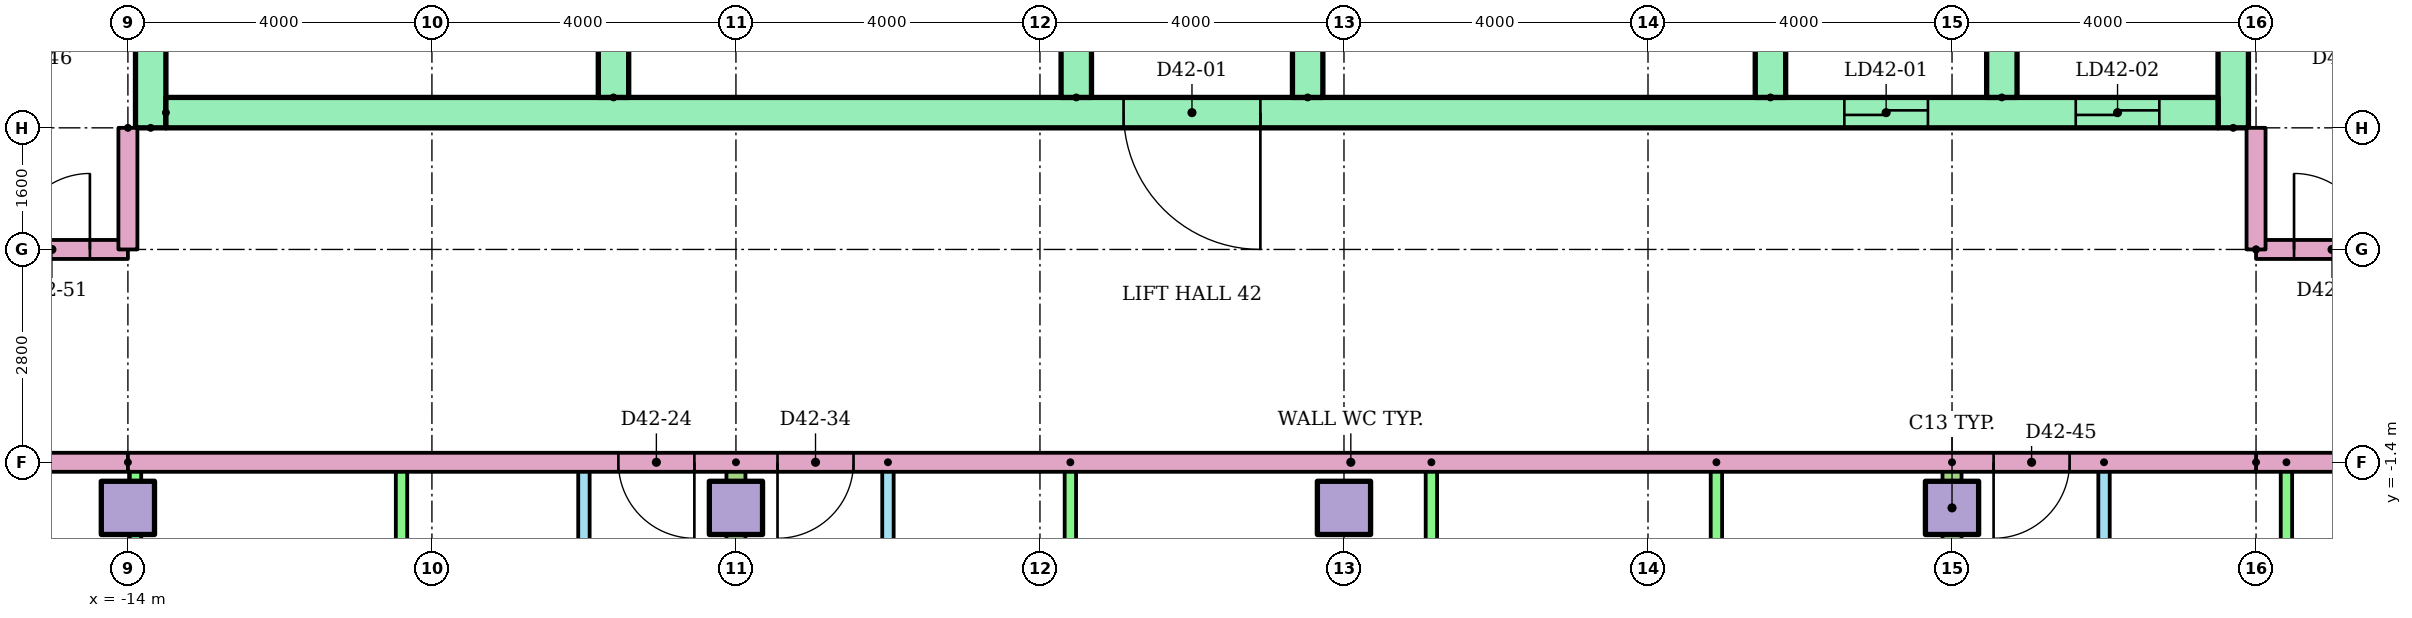
"""IFC4 building model, lengths in metres.
Left out: names, types, materials, properties, quantities, classifications, styles, units other than length and angle.
Written with IfcOpenShell. Run it as: python <this file> out.ifc"""

import sys

from ifc_helpers import new_model, si_unit, direction, frame, frame_2d, origin, origin_2d, place, context, subcontext, project, spatial, rectangle, extrude, element, fill, save


model = new_model("IFC4")
c1 = context("Model", 3, precision=1e-05, world=origin(), true_north=direction((0.0, 1.0)))
c2 = subcontext(c1, "Body", "Model", "MODEL_VIEW")
j1 = project(units=[si_unit("LENGTHUNIT", "METRE"), si_unit("PLANEANGLEUNIT", "RADIAN")], contexts=[c1])
p1 = place(None, origin())
s1 = spatial("IfcSite", under=j1, at=p1, CompositionType="ELEMENT")
p2 = place(p1, origin())
s2 = spatial("IfcBuilding", under=s1, at=p2, CompositionType="ELEMENT")
p3 = place(p2, frame((0.0, 0.0, 165.3)))
s3 = spatial("IfcBuildingStorey", under=s2, at=p3, CompositionType="ELEMENT", Elevation=165.3)
for number, where in (
    (1, (-14.0, -2.0, 0.0)),
    (2, (-6.0, -2.0, 0.0)),
    (3, (2.0, -2.0, 0.0)),
    (4, (10.0, -2.0, 0.0)),
):
    element("IfcColumn", number, at=place(p3, frame(where)), inside=s3, PredefinedType="COLUMN", context=c2, shape_type="SweptSolid", body=[
        extrude(rectangle(XDim=0.7, YDim=0.7, at=origin_2d()), origin(), (0.0, 0.0, 1.0), 3.2),
    ])
for number, where, z_axis, x_axis in (
    (5, (-13.7, 3.0, 0.0), (0.0, 0.0, 1.0), (0.0, 1.0, 0.0)),
    (6, (13.7, 3.0, 0.0), (0.0, 0.0, 1.0), (0.0, 1.0, 0.0)),
):
    element("IfcWall", number, at=place(p3, frame(where, z_axis=z_axis, x_axis=x_axis)), inside=s3, PredefinedType="SHEAR", context=c2, shape_type="SweptSolid", body=[
        extrude(rectangle(XDim=17.0, YDim=0.4, at=frame_2d((8.5, 0.0))), origin(), (0.0, 0.0, 1.0), 2.92),
    ])
p4 = place(p3, frame((-13.5, 3.2, 0.0)))
e7 = element("IfcWall", 7, at=p4, inside=s3, PredefinedType="SHEAR", context=c2, shape_type="SweptSolid", body=[
    extrude(rectangle(XDim=27.0, YDim=0.4, at=frame_2d((13.5, 0.0))), origin(), (0.0, 0.0, 1.0), 2.92),
])
p5 = place(p4, frame((22.083, 0.0, 0.0)))
e8 = element("IfcOpeningElement", 8, at=p5, cuts=e7, PredefinedType="OPENING", context=c2, shape_type="SweptSolid", body=[
    extrude(rectangle(XDim=1.1, YDim=2.1, at=frame_2d((0.55, 1.05))), frame((0.0, 0.21, 0.0), z_axis=(0.0, -1.0, 0.0), x_axis=(1.0, 0.0, 0.0)), (0.0, 0.0, 1.0), 0.42),
])
p6 = place(p4, frame((25.128, 0.0, 0.0)))
e9 = element("IfcOpeningElement", 9, at=p6, cuts=e7, PredefinedType="OPENING", context=c2, shape_type="SweptSolid", body=[
    extrude(rectangle(XDim=1.1, YDim=2.1, at=frame_2d((0.55, 1.05))), frame((0.0, 0.21, 0.0), z_axis=(0.0, -1.0, 0.0), x_axis=(1.0, 0.0, 0.0)), (0.0, 0.0, 1.0), 0.42),
])
p7 = place(p4, frame((12.6, 0.0, 0.0)))
e10 = element("IfcOpeningElement", 10, at=p7, cuts=e7, PredefinedType="OPENING", context=c2, shape_type="SweptSolid", body=[
    extrude(rectangle(XDim=1.8, YDim=2.1, at=frame_2d((0.9, 1.05))), frame((0.0, 0.21, 0.0), z_axis=(0.0, -1.0, 0.0), x_axis=(1.0, 0.0, 0.0)), (0.0, 0.0, 1.0), 0.42),
])
for number, where, z_axis, x_axis in (
    (11, (-7.611, 3.4, 0.0), (0.0, 0.0, 1.0), (0.0, 1.0, 0.0)),
    (12, (-1.522, 3.4, 0.0), (0.0, 0.0, 1.0), (0.0, 1.0, 0.0)),
    (13, (1.522, 3.4, 0.0), (0.0, 0.0, 1.0), (0.0, 1.0, 0.0)),
    (14, (7.611, 3.4, 0.0), (0.0, 0.0, 1.0), (0.0, 1.0, 0.0)),
    (15, (10.656, 3.4, 0.0), (0.0, 0.0, 1.0), (0.0, 1.0, 0.0)),
):
    element("IfcWall", number, at=place(p3, frame(where, z_axis=z_axis, x_axis=x_axis)), inside=s3, PredefinedType="SHEAR", context=c2, shape_type="SweptSolid", body=[
        extrude(rectangle(XDim=3.0, YDim=0.4, at=frame_2d((1.5, 0.0))), origin(), (0.0, 0.0, 1.0), 2.92),
    ])
p8 = place(p3, frame((-8.0, -8.1, 0.0), z_axis=(0.0, 0.0, 1.0), x_axis=(0.0, 1.0, 0.0)))
e16 = element("IfcWall", 16, at=p8, inside=s3, PredefinedType="PARTITIONING", context=c2, shape_type="SweptSolid", body=[
    extrude(rectangle(XDim=6.7, YDim=0.15, at=frame_2d((3.35, 0.0))), origin(), (0.0, 0.0, 1.0), 2.4),
])
p9 = place(p8, frame((4.375, 0.0, 0.0)))
e17 = element("IfcOpeningElement", 17, at=p9, cuts=e16, PredefinedType="OPENING", context=c2, shape_type="SweptSolid", body=[
    extrude(rectangle(XDim=0.9, YDim=2.1, at=frame_2d((0.45, 1.05))), frame((0.0, 0.085, 0.0), z_axis=(0.0, -1.0, 0.0), x_axis=(1.0, 0.0, 0.0)), (0.0, 0.0, 1.0), 0.17),
])
p10 = place(p8, frame((1.075, 0.0, 0.0)))
e18 = element("IfcOpeningElement", 18, at=p10, cuts=e16, PredefinedType="OPENING", context=c2, shape_type="SweptSolid", body=[
    extrude(rectangle(XDim=0.8, YDim=2.1, at=frame_2d((0.4, 1.05))), frame((0.0, 0.085, 0.0), z_axis=(0.0, -1.0, 0.0), x_axis=(1.0, 0.0, 0.0)), (0.0, 0.0, 1.0), 0.17),
])
for number, where, z_axis, x_axis in (
    (19, (-10.4, -8.1, 0.0), (0.0, 0.0, 1.0), (0.0, 1.0, 0.0)),
    (20, (-13.9, -8.1, 0.0), (0.0, 0.0, 1.0), (0.0, 1.0, 0.0)),
):
    element("IfcWall", number, at=place(p3, frame(where, z_axis=z_axis, x_axis=x_axis)), inside=s3, PredefinedType="PARTITIONING", context=c2, shape_type="SweptSolid", body=[
        extrude(rectangle(XDim=6.7, YDim=0.15, at=frame_2d((3.35, 0.0))), origin(), (0.0, 0.0, 1.0), 2.4),
    ])
p11 = place(p3, frame((-4.0, -1.4, 0.0), z_axis=(0.0, 0.0, 1.0), x_axis=(0.0, -1.0, 0.0)))
e21 = element("IfcWall", 21, at=p11, inside=s3, PredefinedType="PARTITIONING", context=c2, shape_type="SweptSolid", body=[
    extrude(rectangle(XDim=6.7, YDim=0.15, at=frame_2d((3.35, 0.0))), origin(), (0.0, 0.0, 1.0), 2.4),
])
p12 = place(p11, frame((1.425, 0.0, 0.0)))
e22 = element("IfcOpeningElement", 22, at=p12, cuts=e21, PredefinedType="OPENING", context=c2, shape_type="SweptSolid", body=[
    extrude(rectangle(XDim=0.9, YDim=2.1, at=frame_2d((0.45, 1.05))), frame((0.0, 0.085, 0.0), z_axis=(0.0, -1.0, 0.0), x_axis=(1.0, 0.0, 0.0)), (0.0, 0.0, 1.0), 0.17),
])
p13 = place(p11, frame((4.825, 0.0, 0.0)))
e23 = element("IfcOpeningElement", 23, at=p13, cuts=e21, PredefinedType="OPENING", context=c2, shape_type="SweptSolid", body=[
    extrude(rectangle(XDim=0.8, YDim=2.1, at=frame_2d((0.4, 1.05))), frame((0.0, 0.085, 0.0), z_axis=(0.0, -1.0, 0.0), x_axis=(1.0, 0.0, 0.0)), (0.0, 0.0, 1.0), 0.17),
])
for number, where, z_axis, x_axis in (
    (24, (-1.6, -1.4, 0.0), (0.0, 0.0, 1.0), (0.0, -1.0, 0.0)),
    (25, (3.15, -1.4, 0.0), (0.0, 0.0, 1.0), (0.0, -1.0, 0.0)),
    (26, (6.9, -1.4, 0.0), (0.0, 0.0, 1.0), (0.0, -1.0, 0.0)),
):
    element("IfcWall", number, at=place(p3, frame(where, z_axis=z_axis, x_axis=x_axis)), inside=s3, PredefinedType="PARTITIONING", context=c2, shape_type="SweptSolid", body=[
        extrude(rectangle(XDim=6.7, YDim=0.15, at=frame_2d((3.35, 0.0))), origin(), (0.0, 0.0, 1.0), 2.4),
    ])
p14 = place(p3, frame((-6.0, -1.4, 0.0), z_axis=(0.0, 0.0, 1.0), x_axis=(0.0, -1.0, 0.0)))
e27 = element("IfcWall", 27, at=p14, inside=s3, PredefinedType="PARTITIONING", context=c2, shape_type="SweptSolid", body=[
    extrude(rectangle(XDim=15.01, YDim=0.25, at=frame_2d((7.505, 0.0))), origin(), (0.0, 0.0, 1.0), 2.4),
])
p15 = place(p3, frame((12.0, -1.4, 0.0), z_axis=(0.0, 0.0, 1.0), x_axis=(0.0, -1.0, 0.0)))
e28 = element("IfcWall", 28, at=p15, inside=s3, PredefinedType="PARTITIONING", context=c2, shape_type="SweptSolid", body=[
    extrude(rectangle(XDim=6.7, YDim=0.15, at=frame_2d((3.35, 0.0))), origin(), (0.0, 0.0, 1.0), 2.4),
])
p16 = place(p15, frame((1.425, 0.0, 0.0)))
e29 = element("IfcOpeningElement", 29, at=p16, cuts=e28, PredefinedType="OPENING", context=c2, shape_type="SweptSolid", body=[
    extrude(rectangle(XDim=0.9, YDim=2.1, at=frame_2d((0.45, 1.05))), frame((0.0, 0.085, 0.0), z_axis=(0.0, -1.0, 0.0), x_axis=(1.0, 0.0, 0.0)), (0.0, 0.0, 1.0), 0.17),
])
p17 = place(p15, frame((4.825, 0.0, 0.0)))
e30 = element("IfcOpeningElement", 30, at=p17, cuts=e28, PredefinedType="OPENING", context=c2, shape_type="SweptSolid", body=[
    extrude(rectangle(XDim=0.8, YDim=2.1, at=frame_2d((0.4, 1.05))), frame((0.0, 0.085, 0.0), z_axis=(0.0, -1.0, 0.0), x_axis=(1.0, 0.0, 0.0)), (0.0, 0.0, 1.0), 0.17),
])
p18 = place(p3, frame((14.4, -1.4, 0.0), z_axis=(0.0, 0.0, 1.0), x_axis=(0.0, -1.0, 0.0)))
e31 = element("IfcWall", 31, at=p18, inside=s3, PredefinedType="PARTITIONING", context=c2, shape_type="SweptSolid", body=[
    extrude(rectangle(XDim=6.7, YDim=0.15, at=frame_2d((3.35, 0.0))), origin(), (0.0, 0.0, 1.0), 2.4),
])
p19 = place(p3, frame((10.0, -1.4, 0.0), z_axis=(0.0, 0.0, 1.0), x_axis=(0.0, -1.0, 0.0)))
e32 = element("IfcWall", 32, at=p19, inside=s3, PredefinedType="PARTITIONING", context=c2, shape_type="SweptSolid", body=[
    extrude(rectangle(XDim=15.01, YDim=0.25, at=frame_2d((7.505, 0.0))), origin(), (0.0, 0.0, 1.0), 2.4),
])
p20 = place(p3, frame((-14.0, -1.4, 0.0), z_axis=(0.0, 0.0, 1.0), x_axis=(-1.0, 0.0, 0.0)))
e33 = element("IfcWall", 33, at=p20, inside=s3, PredefinedType="PARTITIONING", context=c2, shape_type="SweptSolid", body=[
    extrude(rectangle(XDim=10.82, YDim=0.25, at=frame_2d((5.41, 0.0))), origin(), (0.0, 0.0, 1.0), 2.4),
])
p21 = place(p3, frame((29.0, -1.4, 0.0), z_axis=(0.0, 0.0, 1.0), x_axis=(-1.0, 0.0, 0.0)))
e34 = element("IfcWall", 34, at=p21, inside=s3, PredefinedType="PARTITIONING", context=c2, shape_type="SweptSolid", body=[
    extrude(rectangle(XDim=15.0, YDim=0.25, at=frame_2d((7.5, 0.0))), origin(), (0.0, 0.0, 1.0), 2.4),
])
p22 = place(p3, frame((-24.82, 1.4, 0.0)))
e35 = element("IfcWall", 35, at=p22, inside=s3, PredefinedType="PARTITIONING", context=c2, shape_type="SweptSolid", body=[
    extrude(rectangle(XDim=10.82, YDim=0.25, at=frame_2d((5.41, 0.0))), origin(), (0.0, 0.0, 1.0), 2.4),
])
p23 = place(p22, frame((9.32, 0.0, 0.0)))
e36 = element("IfcOpeningElement", 36, at=p23, cuts=e35, PredefinedType="OPENING", context=c2, shape_type="SweptSolid", body=[
    extrude(rectangle(XDim=1.0, YDim=2.1, at=frame_2d((0.5, 1.05))), frame((0.0, 0.135, 0.0), z_axis=(0.0, -1.0, 0.0), x_axis=(1.0, 0.0, 0.0)), (0.0, 0.0, 1.0), 0.27),
])
p24 = place(p3, frame((14.0, 1.4, 0.0)))
e37 = element("IfcWall", 37, at=p24, inside=s3, PredefinedType="PARTITIONING", context=c2, shape_type="SweptSolid", body=[
    extrude(rectangle(XDim=15.0, YDim=0.25, at=frame_2d((7.5, 0.0))), origin(), (0.0, 0.0, 1.0), 2.4),
])
p25 = place(p24, frame((0.5, 0.0, 0.0)))
e38 = element("IfcOpeningElement", 38, at=p25, cuts=e37, PredefinedType="OPENING", context=c2, shape_type="SweptSolid", body=[
    extrude(rectangle(XDim=1.0, YDim=2.1, at=frame_2d((0.5, 1.05))), frame((0.0, 0.135, 0.0), z_axis=(0.0, -1.0, 0.0), x_axis=(1.0, 0.0, 0.0)), (0.0, 0.0, 1.0), 0.27),
])
p26 = place(p24, frame((12.547, 0.0, 0.0)))
e39 = element("IfcOpeningElement", 39, at=p26, cuts=e37, PredefinedType="OPENING", context=c2, shape_type="SweptSolid", body=[
    extrude(rectangle(XDim=1.0, YDim=2.1, at=frame_2d((0.5, 1.05))), frame((0.0, 0.135, 0.0), z_axis=(0.0, -1.0, 0.0), x_axis=(1.0, 0.0, 0.0)), (0.0, 0.0, 1.0), 0.27),
])
p27 = place(p3, frame((14.0, -1.4, 0.0), z_axis=(0.0, 0.0, 1.0), x_axis=(-1.0, 0.0, 0.0)))
e40 = element("IfcWall", 40, at=p27, inside=s3, PredefinedType="PARTITIONING", context=c2, shape_type="SweptSolid", body=[
    extrude(rectangle(XDim=28.0, YDim=0.25, at=frame_2d((14.0, 0.0))), origin(), (0.0, 0.0, 1.0), 2.4),
])
p28 = place(p27, frame((20.547, 0.0, 0.0)))
e41 = element("IfcOpeningElement", 41, at=p28, cuts=e40, PredefinedType="OPENING", context=c2, shape_type="SweptSolid", body=[
    extrude(rectangle(XDim=1.0, YDim=2.1, at=frame_2d((0.5, 1.05))), frame((0.0, 0.135, 0.0), z_axis=(0.0, -1.0, 0.0), x_axis=(1.0, 0.0, 0.0)), (0.0, 0.0, 1.0), 0.27),
])
p29 = place(p27, frame((18.453, 0.0, 0.0)))
e42 = element("IfcOpeningElement", 42, at=p29, cuts=e40, PredefinedType="OPENING", context=c2, shape_type="SweptSolid", body=[
    extrude(rectangle(XDim=1.0, YDim=2.1, at=frame_2d((0.5, 1.05))), frame((0.0, 0.135, 0.0), z_axis=(0.0, -1.0, 0.0), x_axis=(1.0, 0.0, 0.0)), (0.0, 0.0, 1.0), 0.27),
])
p30 = place(p27, frame((2.453, 0.0, 0.0)))
e43 = element("IfcOpeningElement", 43, at=p30, cuts=e40, PredefinedType="OPENING", context=c2, shape_type="SweptSolid", body=[
    extrude(rectangle(XDim=1.0, YDim=2.1, at=frame_2d((0.5, 1.05))), frame((0.0, 0.135, 0.0), z_axis=(0.0, -1.0, 0.0), x_axis=(1.0, 0.0, 0.0)), (0.0, 0.0, 1.0), 0.27),
])
for number, where, z_axis, x_axis in (
    (44, (-14.0, 3.0, 0.0), (0.0, 0.0, 1.0), (0.0, -1.0, 0.0)),
    (45, (14.0, 1.4, 0.0), (0.0, 0.0, 1.0), (0.0, 1.0, 0.0)),
):
    element("IfcWall", number, at=place(p3, frame(where, z_axis=z_axis, x_axis=x_axis)), inside=s3, PredefinedType="PARTITIONING", context=c2, shape_type="SweptSolid", body=[
        extrude(rectangle(XDim=1.6, YDim=0.25, at=frame_2d((0.8, 0.0))), origin(), (0.0, 0.0, 1.0), 2.4),
    ])
p31 = place(p5, origin())
e46 = element("IfcDoor", 46, at=p31, inside=s3, OperationType="SLIDING_TO_LEFT", PredefinedType="DOOR", context=c2, shape_type="SweptSolid", body=[
    extrude(rectangle(XDim=1.1, YDim=2.1, at=frame_2d((0.55, 1.05))), frame((0.0, 0.025, 0.0), z_axis=(0.0, -1.0, 0.0), x_axis=(1.0, 0.0, 0.0)), (0.0, 0.0, 1.0), 0.05),
])
fill(e8, e46)
p32 = place(p6, origin())
e47 = element("IfcDoor", 47, at=p32, inside=s3, OperationType="SLIDING_TO_LEFT", PredefinedType="DOOR", context=c2, shape_type="SweptSolid", body=[
    extrude(rectangle(XDim=1.1, YDim=2.1, at=frame_2d((0.55, 1.05))), frame((0.0, 0.025, 0.0), z_axis=(0.0, -1.0, 0.0), x_axis=(1.0, 0.0, 0.0)), (0.0, 0.0, 1.0), 0.05),
])
fill(e9, e47)
p33 = place(p7, frame((1.8, 0.0, 0.0), z_axis=(0.0, 0.0, 1.0), x_axis=(-1.0, 0.0, 0.0)))
e48 = element("IfcDoor", 48, at=p33, inside=s3, OperationType="DOUBLE_DOOR_SINGLE_SWING", PredefinedType="DOOR", context=c2, shape_type="SweptSolid", body=[
    extrude(rectangle(XDim=1.8, YDim=2.1, at=frame_2d((0.9, 1.05))), frame((0.0, 0.025, 0.0), z_axis=(0.0, -1.0, 0.0), x_axis=(1.0, 0.0, 0.0)), (0.0, 0.0, 1.0), 0.05),
])
fill(e10, e48)
p34 = place(p28, origin())
e49 = element("IfcDoor", 49, at=p34, inside=s3, OperationType="SINGLE_SWING_LEFT", PredefinedType="DOOR", context=c2, shape_type="SweptSolid", body=[
    extrude(rectangle(XDim=1.0, YDim=2.1, at=frame_2d((0.5, 1.05))), frame((0.0, 0.025, 0.0), z_axis=(0.0, -1.0, 0.0), x_axis=(1.0, 0.0, 0.0)), (0.0, 0.0, 1.0), 0.05),
])
fill(e41, e49)
p35 = place(p29, origin())
e50 = element("IfcDoor", 50, at=p35, inside=s3, OperationType="SINGLE_SWING_RIGHT", PredefinedType="DOOR", context=c2, shape_type="SweptSolid", body=[
    extrude(rectangle(XDim=1.0, YDim=2.1, at=frame_2d((0.5, 1.05))), frame((0.0, 0.025, 0.0), z_axis=(0.0, -1.0, 0.0), x_axis=(1.0, 0.0, 0.0)), (0.0, 0.0, 1.0), 0.05),
])
fill(e42, e50)
p36 = place(p30, origin())
e51 = element("IfcDoor", 51, at=p36, inside=s3, OperationType="SINGLE_SWING_RIGHT", PredefinedType="DOOR", context=c2, shape_type="SweptSolid", body=[
    extrude(rectangle(XDim=1.0, YDim=2.1, at=frame_2d((0.5, 1.05))), frame((0.0, 0.025, 0.0), z_axis=(0.0, -1.0, 0.0), x_axis=(1.0, 0.0, 0.0)), (0.0, 0.0, 1.0), 0.05),
])
fill(e43, e51)
p37 = place(p23, origin())
e52 = element("IfcDoor", 52, at=p37, inside=s3, OperationType="SINGLE_SWING_RIGHT", PredefinedType="DOOR", context=c2, shape_type="SweptSolid", body=[
    extrude(rectangle(XDim=1.0, YDim=2.1, at=frame_2d((0.5, 1.05))), frame((0.0, 0.025, 0.0), z_axis=(0.0, -1.0, 0.0), x_axis=(1.0, 0.0, 0.0)), (0.0, 0.0, 1.0), 0.05),
])
fill(e36, e52)
p38 = place(p25, origin())
e53 = element("IfcDoor", 53, at=p38, inside=s3, OperationType="SINGLE_SWING_LEFT", PredefinedType="DOOR", context=c2, shape_type="SweptSolid", body=[
    extrude(rectangle(XDim=1.0, YDim=2.1, at=frame_2d((0.5, 1.05))), frame((0.0, 0.025, 0.0), z_axis=(0.0, -1.0, 0.0), x_axis=(1.0, 0.0, 0.0)), (0.0, 0.0, 1.0), 0.05),
])
fill(e38, e53)
save(model, sys.argv[1])
